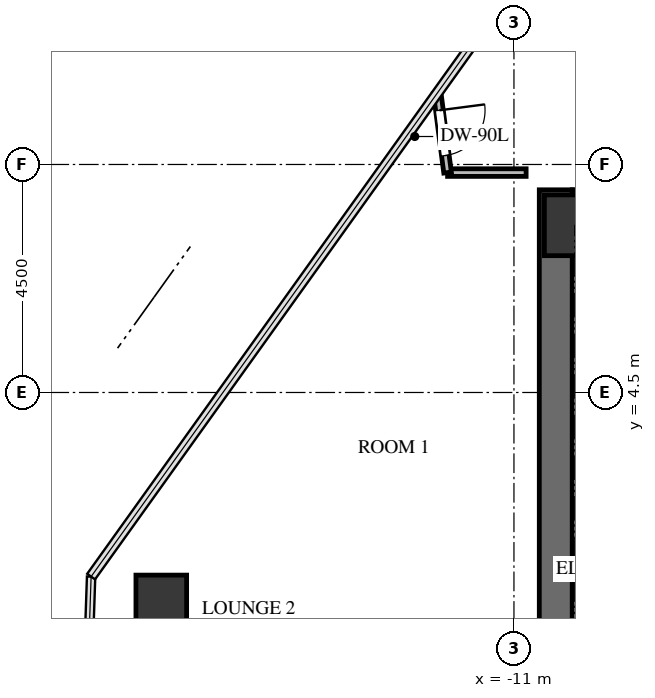
"""IFC4 building model, lengths in metres.
Left out: names, types, materials, properties, quantities, classifications, styles, units other than length and angle.
Written with IfcOpenShell. Run it as: python <this file> out.ifc"""

import sys

from ifc_helpers import new_model, si_unit, direction, frame, frame_2d, origin, origin_2d, place, context, subcontext, project, spatial, rectangle, extrude, source, transform, mapped, element, fill, save


model = new_model("IFC4")
c1 = context("Model", 3, precision=1e-05, world=origin(), true_north=direction((0.0, 1.0)))
c2 = subcontext(c1, "Body", "Model", "MODEL_VIEW")
j1 = project(units=[si_unit("LENGTHUNIT", "METRE"), si_unit("PLANEANGLEUNIT", "RADIAN")], contexts=[c1])
p1 = place(None, origin())
s1 = spatial("IfcSite", under=j1, at=p1, CompositionType="ELEMENT")
p2 = place(p1, origin())
s2 = spatial("IfcBuilding", under=s1, at=p2, CompositionType="ELEMENT")
p3 = place(p2, frame((0.0, 0.0, 190.3)))
s3 = spatial("IfcBuildingStorey", under=s2, at=p3, CompositionType="ELEMENT", Elevation=190.3)
p4 = place(p3, frame((-10.175, -8.5, 0.0), z_axis=(0.0, 0.0, 1.0), x_axis=(0.0, 1.0, 0.0)))
e1 = element("IfcWall", 1, at=p4, inside=s3, PredefinedType="SHEAR", context=c2, shape_type="SweptSolid", body=[
    extrude(rectangle(XDim=17.0, YDim=0.65, at=frame_2d((8.5, 0.0))), origin(), (0.0, 0.0, 1.0), 3.3),
])
p5 = place(p3, frame((-9.85, 8.175, 0.0), z_axis=(0.0, 0.0, 1.0), x_axis=(1.0, 0.0, 0.0)))
e2 = element("IfcWall", 2, at=p5, inside=s3, PredefinedType="SHEAR", context=c2, shape_type="SweptSolid", body=[
    extrude(rectangle(XDim=19.7, YDim=0.65, at=frame_2d((9.85, 0.0))), origin(), (0.0, 0.0, 1.0), 3.3),
])
m1 = source(origin(), c2, "Body", "SweptSolid", [
    extrude(rectangle(XDim=1.2, YDim=1.2, at=origin_2d()), origin(), (0.0, 0.0, 1.0), 3.3),
])
p6 = place(p3, frame((-9.8, 7.8, -0.24), z_axis=(0.0, 0.0, 1.0), x_axis=(1.0, 0.0, 0.0)))
e3 = element("IfcColumn", 3, at=p6, inside=s3, PredefinedType="COLUMN", context=c2, shape_type="MappedRepresentation", body=[
    mapped(m1, transform((0.0, 0.0, 0.0), x_axis=(1.0, 0.0, 0.0), y_axis=(0.0, 1.0, 0.0), z_axis=(0.0, 0.0, 1.0), scale=1.0)),
])
m2 = source(origin(), c2, "Body", "SweptSolid", [
    extrude(rectangle(XDim=1.0, YDim=1.0, at=origin_2d()), origin(), (0.0, 0.0, 1.0), 3.3),
])
p7 = place(p3, frame((-17.96, 0.396, -0.24), z_axis=(0.0, 0.0, 1.0), x_axis=(1.0, 0.0, 0.0)))
e4 = element("IfcColumn", 4, at=p7, inside=s3, PredefinedType="COLUMN", context=c2, shape_type="MappedRepresentation", body=[
    mapped(m2, transform((0.0, 0.0, 0.0), x_axis=(1.0, 0.0, 0.0), y_axis=(0.0, 1.0, 0.0), z_axis=(0.0, 0.0, 1.0), scale=1.0)),
])
p8 = place(p3, frame((-12.31, 8.84, 0.0), z_axis=(0.0, 0.0, 1.0), x_axis=(1.0, 0.0, 0.0)))
e5 = element("IfcWall", 5, at=p8, inside=s3, PredefinedType="PARTITIONING", context=c2, shape_type="SweptSolid", body=[
    extrude(rectangle(XDim=1.55, YDim=0.15, at=frame_2d((0.775, 0.0))), origin(), (0.0, 0.0, 1.0), 2.399),
])
p9 = place(p3, frame((-12.514, 10.406, 0.0), z_axis=(0.0, 0.0, 1.0), x_axis=(0.129378833178, -0.991595238757, 0.0)))
e6 = element("IfcWall", 6, at=p9, inside=s3, PredefinedType="PARTITIONING", context=c2, shape_type="SweptSolid", body=[
    extrude(rectangle(XDim=1.579, YDim=0.15, at=frame_2d((0.79, 0.0))), origin(), (0.0, 0.0, 1.0), 3.045),
])
p10 = place(p9, frame((0.34, 0.0, 0.0)))
e7 = element("IfcOpeningElement", 7, at=p10, cuts=e6, PredefinedType="OPENING", context=c2, shape_type="SweptSolid", body=[
    extrude(rectangle(XDim=0.9, YDim=2.05, at=frame_2d((0.45, 1.025))), frame((0.0, 0.085, 0.0), z_axis=(0.0, -1.0, 0.0), x_axis=(1.0, 0.0, 0.0)), (0.0, 0.0, 1.0), 0.17),
])
m3 = source(origin(), c2, "Body", "SweptSolid", [
    extrude(rectangle(XDim=0.9, YDim=2.05, at=frame_2d((0.45, 1.025))), frame((0.0, 0.025, 0.0), z_axis=(0.0, -1.0, 0.0), x_axis=(1.0, 0.0, 0.0)), (0.0, 0.0, 1.0), 0.05),
])
p11 = place(p10, origin())
e8 = element("IfcDoor", 8, at=p11, inside=s3, OperationType="SINGLE_SWING_LEFT", PredefinedType="DOOR", context=c2, shape_type="MappedRepresentation", body=[
    mapped(m3, transform((0.0, 0.0, 0.0), x_axis=(1.0, 0.0, 0.0), y_axis=(0.0, 1.0, 0.0), z_axis=(0.0, 0.0, 1.0), scale=1.0)),
])
fill(e7, e8)
save(model, sys.argv[1])
